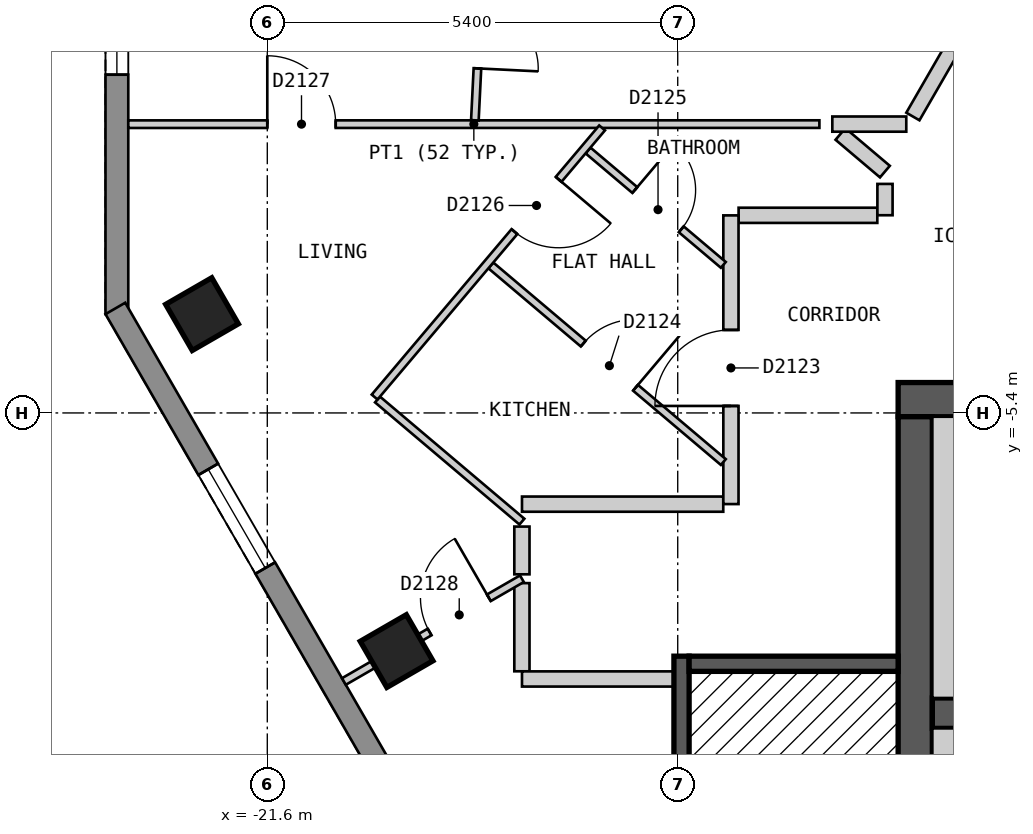
"""IFC4 building model, lengths in metres.
Left out: names, types, materials, properties, quantities, classifications, styles, units other than length and angle.
Written with IfcOpenShell. Run it as: python <this file> out.ifc"""

import sys

from ifc_helpers import new_model, si_unit, direction, frame, frame_2d, origin, origin_2d, place, context, subcontext, project, spatial, polyline, rectangle, outline, extrude, element, fill, save


model = new_model("IFC4")
c1 = context("Model", 3, precision=1e-05, world=origin(), true_north=direction((0.0, 1.0)))
c2 = subcontext(c1, "Body", "Model", "MODEL_VIEW")
j1 = project(units=[si_unit("LENGTHUNIT", "METRE"), si_unit("PLANEANGLEUNIT", "RADIAN")], contexts=[c1])
p1 = place(None, origin())
s1 = spatial("IfcSite", under=j1, at=p1, CompositionType="ELEMENT")
p2 = place(p1, origin())
s2 = spatial("IfcBuilding", under=s1, at=p2, CompositionType="ELEMENT")
p3 = place(p2, frame((0.0, 0.0, 217.8)))
s3 = spatial("IfcBuildingStorey", under=s2, at=p3, CompositionType="ELEMENT", Elevation=217.8)
for number, where, z_axis, x_axis in (
    (1, (-22.459, -4.1, 0.0), (0.0, 0.0, 1.0), (0.5, -0.866, 0.0)),
    (2, (-19.899, -8.533, 0.0), (0.0, 0.0, 1.0), (0.5, -0.866, 0.0)),
):
    element("IfcColumn", number, at=place(p3, frame(where, z_axis=z_axis, x_axis=x_axis)), inside=s3, PredefinedType="COLUMN", context=c2, shape_type="SweptSolid", body=[
        extrude(rectangle(XDim=0.7, YDim=0.7, at=origin_2d()), origin(), (0.0, 0.0, 1.0), 3.0),
    ])
p4 = place(p3, frame((-13.3, -5.225, 0.0), z_axis=(0.0, 0.0, 1.0), x_axis=(1.0, 0.0, 0.0)))
e3 = element("IfcWall", 3, at=p4, inside=s3, PredefinedType="SHEAR", context=c2, shape_type="SweptSolid", body=[
    extrude(rectangle(XDim=26.6, YDim=0.45, at=frame_2d((13.3, 0.0))), origin(), (0.0, 0.0, 1.0), 2.7),
])
p5 = place(p4, frame((23.65, 0.0, 0.0)))
e4 = element("IfcOpeningElement", 4, at=p5, cuts=e3, PredefinedType="OPENING", context=c2, shape_type="SweptSolid", body=[
    extrude(rectangle(XDim=1.2, YDim=2.1, at=frame_2d((0.6, 1.05))), frame((0.0, 0.235, 0.0), z_axis=(0.0, -1.0, 0.0), x_axis=(1.0, 0.0, 0.0)), (0.0, 0.0, 1.0), 0.47),
])
p6 = place(p3, frame((-13.075, -18.55, 0.0), z_axis=(0.0, 0.0, 1.0), x_axis=(0.0, 1.0, 0.0)))
e5 = element("IfcWall", 5, at=p6, inside=s3, PredefinedType="SHEAR", context=c2, shape_type="SweptSolid", body=[
    extrude(rectangle(XDim=13.1, YDim=0.45, at=frame_2d((6.55, 0.0))), origin(), (0.0, 0.0, 1.0), 2.7),
])
p7 = place(p6, frame((4.35, 0.0, 0.0)))
e6 = element("IfcOpeningElement", 6, at=p7, cuts=e5, PredefinedType="OPENING", context=c2, shape_type="SweptSolid", body=[
    extrude(rectangle(XDim=1.2, YDim=2.1, at=frame_2d((0.6, 1.05))), frame((0.0, 0.235, 0.0), z_axis=(0.0, -1.0, 0.0), x_axis=(1.0, 0.0, 0.0)), (0.0, 0.0, 1.0), 0.47),
])
p8 = place(p3, frame((-12.85, -9.35, 0.0), z_axis=(0.0, 0.0, 1.0), x_axis=(1.0, 0.0, 0.0)))
e7 = element("IfcWall", 7, at=p8, inside=s3, PredefinedType="SHEAR", context=c2, shape_type="SweptSolid", body=[
    extrude(rectangle(XDim=23.05, YDim=0.4, at=frame_2d((11.525, 0.0))), origin(), (0.0, 0.0, 1.0), 2.7),
])
p9 = place(p8, frame((1.45, 0.0, 0.0)))
e8 = element("IfcOpeningElement", 8, at=p9, cuts=e7, PredefinedType="OPENING", context=c2, shape_type="SweptSolid", body=[
    extrude(rectangle(XDim=1.1, YDim=2.1, at=frame_2d((0.55, 1.05))), frame((0.0, 0.21, 0.0), z_axis=(0.0, -1.0, 0.0), x_axis=(1.0, 0.0, 0.0)), (0.0, 0.0, 1.0), 0.42),
])
p10 = place(p8, frame((4.25, 0.0, 0.0)))
e9 = element("IfcOpeningElement", 9, at=p10, cuts=e7, PredefinedType="OPENING", context=c2, shape_type="SweptSolid", body=[
    extrude(rectangle(XDim=1.1, YDim=2.1, at=frame_2d((0.55, 1.05))), frame((0.0, 0.21, 0.0), z_axis=(0.0, -1.0, 0.0), x_axis=(1.0, 0.0, 0.0)), (0.0, 0.0, 1.0), 0.42),
])
p11 = place(p8, frame((7.05, 0.0, 0.0)))
e10 = element("IfcOpeningElement", 10, at=p11, cuts=e7, PredefinedType="OPENING", context=c2, shape_type="SweptSolid", body=[
    extrude(rectangle(XDim=1.1, YDim=2.1, at=frame_2d((0.55, 1.05))), frame((0.0, 0.21, 0.0), z_axis=(0.0, -1.0, 0.0), x_axis=(1.0, 0.0, 0.0)), (0.0, 0.0, 1.0), 0.42),
])
p12 = place(p8, frame((9.35, 0.0, 0.0)))
e11 = element("IfcOpeningElement", 11, at=p12, cuts=e7, PredefinedType="OPENING", context=c2, shape_type="SweptSolid", body=[
    extrude(rectangle(XDim=1.1, YDim=2.1, at=frame_2d((0.55, 1.05))), frame((0.0, 0.21, 0.0), z_axis=(0.0, -1.0, 0.0), x_axis=(1.0, 0.0, 0.0)), (0.0, 0.0, 1.0), 0.42),
])
p13 = place(p8, frame((11.65, 0.0, 0.0)))
e12 = element("IfcOpeningElement", 12, at=p13, cuts=e7, PredefinedType="OPENING", context=c2, shape_type="SweptSolid", body=[
    extrude(rectangle(XDim=1.1, YDim=2.1, at=frame_2d((0.55, 1.05))), frame((0.0, 0.21, 0.0), z_axis=(0.0, -1.0, 0.0), x_axis=(1.0, 0.0, 0.0)), (0.0, 0.0, 1.0), 0.42),
])
p14 = place(p8, frame((13.95, 0.0, 0.0)))
e13 = element("IfcOpeningElement", 13, at=p14, cuts=e7, PredefinedType="OPENING", context=c2, shape_type="SweptSolid", body=[
    extrude(rectangle(XDim=1.1, YDim=2.1, at=frame_2d((0.55, 1.05))), frame((0.0, 0.21, 0.0), z_axis=(0.0, -1.0, 0.0), x_axis=(1.0, 0.0, 0.0)), (0.0, 0.0, 1.0), 0.42),
])
p15 = place(p8, frame((16.25, 0.0, 0.0)))
e14 = element("IfcOpeningElement", 14, at=p15, cuts=e7, PredefinedType="OPENING", context=c2, shape_type="SweptSolid", body=[
    extrude(rectangle(XDim=1.1, YDim=2.1, at=frame_2d((0.55, 1.05))), frame((0.0, 0.21, 0.0), z_axis=(0.0, -1.0, 0.0), x_axis=(1.0, 0.0, 0.0)), (0.0, 0.0, 1.0), 0.42),
])
p16 = place(p8, frame((18.55, 0.0, 0.0)))
e15 = element("IfcOpeningElement", 15, at=p16, cuts=e7, PredefinedType="OPENING", context=c2, shape_type="SweptSolid", body=[
    extrude(rectangle(XDim=1.1, YDim=2.1, at=frame_2d((0.55, 1.05))), frame((0.0, 0.21, 0.0), z_axis=(0.0, -1.0, 0.0), x_axis=(1.0, 0.0, 0.0)), (0.0, 0.0, 1.0), 0.42),
])
p17 = place(p8, frame((20.95, 0.0, 0.0)))
e16 = element("IfcOpeningElement", 16, at=p17, cuts=e7, PredefinedType="OPENING", context=c2, shape_type="SweptSolid", body=[
    extrude(rectangle(XDim=1.1, YDim=2.1, at=frame_2d((0.55, 1.05))), frame((0.0, 0.21, 0.0), z_axis=(0.0, -1.0, 0.0), x_axis=(1.0, 0.0, 0.0)), (0.0, 0.0, 1.0), 0.42),
])
p18 = place(p3, frame((-23.579, 0.9, 0.0), z_axis=(0.0, 0.0, 1.0), x_axis=(0.0, -1.0, 0.0)))
e17 = element("IfcWall", 17, at=p18, inside=s3, PredefinedType="SOLIDWALL", context=c2, shape_type="SweptSolid", body=[
    extrude(outline(polyline([(0.0, -0.15), (5.0, -0.15), (4.92, 0.15), (0.08, 0.15), (0.0, -0.15)])), origin(), (0.0, 0.0, 1.0), 2.7),
])
p19 = place(p18, frame((0.65, 0.0, 0.15)))
e18 = element("IfcOpeningElement", 18, at=p19, cuts=e17, PredefinedType="OPENING", context=c2, shape_type="SweptSolid", body=[
    extrude(rectangle(XDim=1.2, YDim=2.1, at=frame_2d((0.6, 1.05))), frame((0.0, 0.16, 0.0), z_axis=(0.0, -1.0, 0.0), x_axis=(1.0, 0.0, 0.0)), (0.0, 0.0, 1.0), 0.32),
])
p20 = place(p3, frame((-23.599, -4.025, 0.0), z_axis=(0.0, 0.0, 1.0), x_axis=(0.500012653391, -0.866018098222, 0.0)))
e19 = element("IfcWall", 19, at=p20, inside=s3, PredefinedType="SOLIDWALL", context=c2, shape_type="SweptSolid", body=[
    extrude(outline(polyline([(0.0, -0.15), (16.628, -0.15), (16.548, 0.15), (0.08, 0.15), (0.0, -0.15)])), origin(), (0.0, 0.0, 1.0), 2.7),
])
p21 = place(p20, frame((2.444, 0.0, 0.15)))
e20 = element("IfcOpeningElement", 20, at=p21, cuts=e19, PredefinedType="OPENING", context=c2, shape_type="SweptSolid", body=[
    extrude(rectangle(XDim=1.5, YDim=2.1, at=frame_2d((0.75, 1.05))), frame((0.0, 0.16, 0.0), z_axis=(0.0, -1.0, 0.0), x_axis=(1.0, 0.0, 0.0)), (0.0, 0.0, 1.0), 0.32),
])
p22 = place(p20, frame((7.564, 0.0, 0.15)))
e21 = element("IfcOpeningElement", 21, at=p22, cuts=e19, PredefinedType="OPENING", context=c2, shape_type="SweptSolid", body=[
    extrude(rectangle(XDim=1.5, YDim=2.1, at=frame_2d((0.75, 1.05))), frame((0.0, 0.16, 0.0), z_axis=(0.0, -1.0, 0.0), x_axis=(1.0, 0.0, 0.0)), (0.0, 0.0, 1.0), 0.32),
])
p23 = place(p20, frame((12.682, 0.0, 0.15)))
e22 = element("IfcOpeningElement", 22, at=p23, cuts=e19, PredefinedType="OPENING", context=c2, shape_type="SweptSolid", body=[
    extrude(rectangle(XDim=1.5, YDim=2.1, at=frame_2d((0.75, 1.05))), frame((0.0, 0.16, 0.0), z_axis=(0.0, -1.0, 0.0), x_axis=(1.0, 0.0, 0.0)), (0.0, 0.0, 1.0), 0.32),
])
p24 = place(p3, frame((-18.25, -7.639, 0.0), z_axis=(0.0, 0.0, 1.0), x_axis=(0.0, -1.0, 0.0)))
e23 = element("IfcWall", 23, at=p24, inside=s3, PredefinedType="PARTITIONING", context=c2, shape_type="SweptSolid", body=[
    extrude(rectangle(XDim=1.16, YDim=0.2, at=frame_2d((0.58, 0.0))), origin(), (0.0, 0.0, 1.0), 2.7),
])
p25 = place(p3, frame((-18.249, -6.6, 0.0), z_axis=(0.0, 0.0, 1.0), x_axis=(1.0, 0.0, 0.0)))
e24 = element("IfcWall", 24, at=p25, inside=s3, PredefinedType="PARTITIONING", context=c2, shape_type="SweptSolid", body=[
    extrude(rectangle(XDim=2.648, YDim=0.2, at=frame_2d((1.324, 0.0))), origin(), (0.0, 0.0, 1.0), 2.7),
])
p26 = place(p3, frame((-18.249, -8.9, 0.0), z_axis=(0.0, 0.0, 1.0), x_axis=(1.0, 0.0, 0.0)))
e25 = element("IfcWall", 25, at=p26, inside=s3, PredefinedType="PARTITIONING", context=c2, shape_type="SweptSolid", body=[
    extrude(rectangle(XDim=2.199, YDim=0.2, at=frame_2d((1.1, 0.0))), origin(), (0.0, 0.0, 1.0), 2.7),
])
p27 = place(p3, frame((-15.399, -2.8, 0.0), z_axis=(0.0, 0.0, 1.0), x_axis=(1.0, 0.0, 0.0)))
e26 = element("IfcWall", 26, at=p27, inside=s3, PredefinedType="PARTITIONING", context=c2, shape_type="SweptSolid", body=[
    extrude(rectangle(XDim=1.825, YDim=0.2, at=frame_2d((0.913, 0.0))), origin(), (0.0, 0.0, 1.0), 2.7),
])
p28 = place(p3, frame((-13.106, -1.5, 0.0), z_axis=(0.0, 0.0, 1.0), x_axis=(0.500025705601, 0.86601056214, 0.0)))
e27 = element("IfcWall", 27, at=p28, inside=s3, PredefinedType="PARTITIONING", context=c2, shape_type="SweptSolid", body=[
    extrude(rectangle(XDim=7.735, YDim=0.2, at=frame_2d((3.868, 0.0))), origin(), (0.0, 0.0, 1.0), 2.7),
])
p29 = place(p28, frame((4.748, 0.0, 0.0)))
e28 = element("IfcOpeningElement", 28, at=p29, cuts=e27, PredefinedType="OPENING", context=c2, shape_type="SweptSolid", body=[
    extrude(rectangle(XDim=1.0, YDim=2.1, at=frame_2d((0.5, 1.05))), frame((0.0, 0.11, 0.0), z_axis=(0.0, -1.0, 0.0), x_axis=(1.0, 0.0, 0.0)), (0.0, 0.0, 1.0), 0.22),
])
p30 = place(p3, frame((-13.473, -2.799, 0.0), z_axis=(0.0, 0.0, 1.0), x_axis=(0.0, 1.0, 0.0)))
e29 = element("IfcWall", 29, at=p30, inside=s3, PredefinedType="PARTITIONING", context=c2, shape_type="SweptSolid", body=[
    extrude(rectangle(XDim=0.412, YDim=0.2, at=frame_2d((0.206, 0.0))), origin(), (0.0, 0.0, 1.0), 2.7),
])
p31 = place(p3, frame((-15.5, -6.599, 0.0), z_axis=(0.0, 0.0, 1.0), x_axis=(0.0, 1.0, 0.0)))
e30 = element("IfcWall", 30, at=p31, inside=s3, PredefinedType="PARTITIONING", context=c2, shape_type="SweptSolid", body=[
    extrude(rectangle(XDim=3.798, YDim=0.2, at=frame_2d((1.899, 0.0))), origin(), (0.0, 0.0, 1.0), 2.7),
])
p32 = place(p31, frame((1.291, 0.0, 0.0)))
e31 = element("IfcOpeningElement", 31, at=p32, cuts=e30, PredefinedType="OPENING", context=c2, shape_type="SweptSolid", body=[
    extrude(rectangle(XDim=1.0, YDim=2.1, at=frame_2d((0.5, 1.05))), frame((0.0, 0.11, 0.0), z_axis=(0.0, -1.0, 0.0), x_axis=(1.0, 0.0, 0.0)), (0.0, 0.0, 1.0), 0.22),
])
p33 = place(p3, frame((-18.25, -7.523, 0.0), z_axis=(0.0, 0.0, 1.0), x_axis=(0.0, 1.0, 0.0)))
e32 = element("IfcWall", 32, at=p33, inside=s3, PredefinedType="PARTITIONING", context=c2, shape_type="SweptSolid", body=[
    extrude(rectangle(XDim=0.628, YDim=0.2, at=frame_2d((0.314, 0.0))), origin(), (0.0, 0.0, 1.0), 2.7),
])
p34 = place(p3, frame((-17.38, -1.947, 0.0), z_axis=(0.0, 0.0, 1.0), x_axis=(0.763616683524, -0.645669854217, 0.0)))
e33 = element("IfcWall", 33, at=p34, inside=s3, PredefinedType="PARTITIONING", context=c2, shape_type="SweptSolid", body=[
    extrude(rectangle(XDim=2.331, YDim=0.1, at=frame_2d((1.166, 0.0))), origin(), (0.0, 0.0, 1.0), 2.7),
])
p35 = place(p34, frame((0.806, 0.0, 0.0)))
e34 = element("IfcOpeningElement", 34, at=p35, cuts=e33, PredefinedType="OPENING", context=c2, shape_type="SweptSolid", body=[
    extrude(rectangle(XDim=0.8, YDim=2.1, at=frame_2d((0.4, 1.05))), frame((0.0, 0.06, 0.0), z_axis=(0.0, -1.0, 0.0), x_axis=(1.0, 0.0, 0.0)), (0.0, 0.0, 1.0), 0.12),
])
p36 = place(p3, frame((-18.659, -3.459, 0.0), z_axis=(0.0, 0.0, 1.0), x_axis=(0.763550385572, -0.64574825489, 0.0)))
e35 = element("IfcWall", 35, at=p36, inside=s3, PredefinedType="PARTITIONING", context=c2, shape_type="SweptSolid", body=[
    extrude(rectangle(XDim=4.006, YDim=0.1, at=frame_2d((2.003, 0.0))), origin(), (0.0, 0.0, 1.0), 2.7),
])
p37 = place(p36, frame((1.593, 0.0, 0.0)))
e36 = element("IfcOpeningElement", 36, at=p37, cuts=e35, PredefinedType="OPENING", context=c2, shape_type="SweptSolid", body=[
    extrude(rectangle(XDim=0.9, YDim=2.1, at=frame_2d((0.45, 1.05))), frame((0.0, 0.06, 0.0), z_axis=(0.0, -1.0, 0.0), x_axis=(1.0, 0.0, 0.0)), (0.0, 0.0, 1.0), 0.12),
])
p38 = place(p3, frame((-20.15, -5.223, 0.0), z_axis=(0.0, 0.0, 1.0), x_axis=(0.763471868926, -0.645841083672, 0.0)))
e37 = element("IfcWall", 37, at=p38, inside=s3, PredefinedType="PARTITIONING", context=c2, shape_type="SweptSolid", body=[
    extrude(rectangle(XDim=2.489, YDim=0.1, at=frame_2d((1.244, 0.0))), origin(), (0.0, 0.0, 1.0), 2.7),
])
p39 = place(p3, frame((-23.429, -1.601, 0.0), z_axis=(0.0, 0.0, 1.0), x_axis=(0.999999994233, 0.000107396965, 0.0)))
e38 = element("IfcWall", 38, at=p39, inside=s3, PredefinedType="PARTITIONING", context=c2, shape_type="SweptSolid", body=[
    extrude(rectangle(XDim=9.093, YDim=0.1, at=frame_2d((4.546, 0.0))), origin(), (0.0, 0.0, 1.0), 2.7),
])
p40 = place(p39, frame((1.829, 0.0, 0.0)))
e39 = element("IfcOpeningElement", 39, at=p40, cuts=e38, PredefinedType="OPENING", context=c2, shape_type="SweptSolid", body=[
    extrude(rectangle(XDim=0.9, YDim=2.1, at=frame_2d((0.45, 1.05))), frame((0.0, 0.06, 0.0), z_axis=(0.0, -1.0, 0.0), x_axis=(1.0, 0.0, 0.0)), (0.0, 0.0, 1.0), 0.12),
])
p41 = place(p3, frame((-20.188, -5.191, 0.0), z_axis=(0.0, 0.0, 1.0), x_axis=(0.645524337256, 0.763739700429, 0.0)))
e40 = element("IfcWall", 40, at=p41, inside=s3, PredefinedType="PARTITIONING", context=c2, shape_type="SweptSolid", body=[
    extrude(rectangle(XDim=4.636, YDim=0.1, at=frame_2d((2.318, 0.0))), origin(), (0.0, 0.0, 1.0), 2.7),
])
p42 = place(p41, frame((2.85, 0.0, 0.0)))
e41 = element("IfcOpeningElement", 41, at=p42, cuts=e40, PredefinedType="OPENING", context=c2, shape_type="SweptSolid", body=[
    extrude(rectangle(XDim=0.9, YDim=2.1, at=frame_2d((0.45, 1.05))), frame((0.0, 0.06, 0.0), z_axis=(0.0, -1.0, 0.0), x_axis=(1.0, 0.0, 0.0)), (0.0, 0.0, 1.0), 0.12),
])
p43 = place(p3, frame((-18.869, -1.55, 0.0), z_axis=(0.0, 0.0, 1.0), x_axis=(0.049189853645, 0.998789446429, 0.0)))
e42 = element("IfcWall", 42, at=p43, inside=s3, PredefinedType="PARTITIONING", context=c2, shape_type="SweptSolid", body=[
    extrude(rectangle(XDim=1.97, YDim=0.1, at=frame_2d((0.985, 0.0))), origin(), (0.0, 0.0, 1.0), 2.7),
])
p44 = place(p43, frame((0.684, 0.0, 0.0)))
e43 = element("IfcOpeningElement", 43, at=p44, cuts=e42, PredefinedType="OPENING", context=c2, shape_type="SweptSolid", body=[
    extrude(rectangle(XDim=0.8, YDim=2.1, at=frame_2d((0.4, 1.05))), frame((0.0, 0.06, 0.0), z_axis=(0.0, -1.0, 0.0), x_axis=(1.0, 0.0, 0.0)), (0.0, 0.0, 1.0), 0.12),
])
p45 = place(p3, frame((-20.592, -8.933, 0.0), z_axis=(0.0, 0.0, 1.0), x_axis=(0.866045775131, 0.499964714133, 0.0)))
e44 = element("IfcWall", 44, at=p45, inside=s3, PredefinedType="PARTITIONING", context=c2, shape_type="SweptSolid", body=[
    extrude(rectangle(XDim=2.704, YDim=0.1, at=frame_2d((1.352, 0.0))), origin(), (0.0, 0.0, 1.0), 2.7),
])
p46 = place(p45, frame((1.302, 0.0, 0.0)))
e45 = element("IfcOpeningElement", 45, at=p46, cuts=e44, PredefinedType="OPENING", context=c2, shape_type="SweptSolid", body=[
    extrude(rectangle(XDim=0.9, YDim=2.1, at=frame_2d((0.45, 1.05))), frame((0.0, 0.06, 0.0), z_axis=(0.0, -1.0, 0.0), x_axis=(1.0, 0.0, 0.0)), (0.0, 0.0, 1.0), 0.12),
])
p47 = place(p3, frame((-14.059, -1.73, 0.0), z_axis=(0.0, 0.0, 1.0), x_axis=(0.763289607824, -0.64605647941, 0.0)))
e46 = element("IfcWall", 46, at=p47, inside=s3, PredefinedType="PARTITIONING", context=c2, shape_type="SweptSolid", body=[
    extrude(rectangle(XDim=0.766, YDim=0.2, at=frame_2d((0.383, 0.0))), origin(), (0.0, 0.0, 1.0), 2.7),
])
p48 = place(p3, frame((-14.166, -1.6, 0.0), z_axis=(0.0, 0.0, 1.0), x_axis=(1.0, 0.0, 0.0)))
e47 = element("IfcWall", 47, at=p48, inside=s3, PredefinedType="PARTITIONING", context=c2, shape_type="SweptSolid", body=[
    extrude(rectangle(XDim=0.973, YDim=0.2, at=frame_2d((0.486, 0.0))), origin(), (0.0, 0.0, 1.0), 2.7),
])
p49 = place(p3, frame((-16.15, -14.4, 0.0), z_axis=(0.0, 0.0, 1.0), x_axis=(0.0, 1.0, 0.0)))
e48 = element("IfcWall", 48, at=p49, inside=s3, PredefinedType="SOLIDWALL", context=c2, shape_type="SweptSolid", body=[
    extrude(rectangle(XDim=5.8, YDim=0.2, at=frame_2d((2.9, 0.0))), origin(), (0.0, 0.0, 1.0), 2.7),
])
p50 = place(p3, frame((-16.05, -8.7, 0.0), z_axis=(0.0, 0.0, 1.0), x_axis=(1.0, 0.0, 0.0)))
e49 = element("IfcWall", 49, at=p50, inside=s3, PredefinedType="SOLIDWALL", context=c2, shape_type="SweptSolid", body=[
    extrude(rectangle(XDim=2.75, YDim=0.2, at=frame_2d((1.375, 0.0))), origin(), (0.0, 0.0, 1.0), 2.7),
])
p51 = place(p3, frame((-12.475, -13.0, 0.0), z_axis=(0.0, 0.0, 1.0), x_axis=(0.0, 1.0, 0.0)))
e50 = element("IfcWall", 50, at=p51, inside=s3, PredefinedType="PARTITIONING", context=c2, shape_type="SweptSolid", body=[
    extrude(rectangle(XDim=3.45, YDim=0.75, at=frame_2d((1.725, 0.0))), origin(), (0.0, 0.0, 1.0), 2.7),
])
p52 = place(p3, frame((-12.475, -9.15, 0.0), z_axis=(0.0, 0.0, 1.0), x_axis=(0.0, 1.0, 0.0)))
e51 = element("IfcWall", 51, at=p52, inside=s3, PredefinedType="SOLIDWALL", context=c2, shape_type="SweptSolid", body=[
    extrude(rectangle(XDim=3.7, YDim=0.75, at=frame_2d((1.85, 0.0))), origin(), (0.0, 0.0, 1.0), 2.7),
])
p53 = place(p19, origin())
e52 = element("IfcWindow", 52, at=p53, inside=s3, PartitioningType="SINGLE_PANEL", PredefinedType="WINDOW", context=c2, shape_type="SweptSolid", body=[
    extrude(rectangle(XDim=1.2, YDim=2.1, at=frame_2d((0.6, 1.05))), frame((0.0, 0.03, 0.0), z_axis=(0.0, -1.0, 0.0), x_axis=(1.0, 0.0, 0.0)), (0.0, 0.0, 1.0), 0.06),
])
fill(e18, e52)
p54 = place(p21, origin())
e53 = element("IfcWindow", 53, at=p54, inside=s3, PartitioningType="SINGLE_PANEL", PredefinedType="WINDOW", context=c2, shape_type="SweptSolid", body=[
    extrude(rectangle(XDim=1.5, YDim=2.1, at=frame_2d((0.75, 1.05))), frame((0.0, 0.03, 0.0), z_axis=(0.0, -1.0, 0.0), x_axis=(1.0, 0.0, 0.0)), (0.0, 0.0, 1.0), 0.06),
])
fill(e20, e53)
p55 = place(p32, origin())
e54 = element("IfcDoor", 54, at=p55, inside=s3, OperationType="SINGLE_SWING_LEFT", PredefinedType="DOOR", context=c2, shape_type="SweptSolid", body=[
    extrude(rectangle(XDim=1.0, YDim=2.1, at=frame_2d((0.5, 1.05))), frame((0.0, 0.025, 0.0), z_axis=(0.0, -1.0, 0.0), x_axis=(1.0, 0.0, 0.0)), (0.0, 0.0, 1.0), 0.05),
])
fill(e31, e54)
p56 = place(p37, origin())
e55 = element("IfcDoor", 55, at=p56, inside=s3, OperationType="SINGLE_SWING_RIGHT", PredefinedType="DOOR", context=c2, shape_type="SweptSolid", body=[
    extrude(rectangle(XDim=0.9, YDim=2.1, at=frame_2d((0.45, 1.05))), frame((0.0, 0.025, 0.0), z_axis=(0.0, -1.0, 0.0), x_axis=(1.0, 0.0, 0.0)), (0.0, 0.0, 1.0), 0.05),
])
fill(e36, e55)
p57 = place(p35, origin())
e56 = element("IfcDoor", 56, at=p57, inside=s3, OperationType="SINGLE_SWING_LEFT", PredefinedType="DOOR", context=c2, shape_type="SweptSolid", body=[
    extrude(rectangle(XDim=0.8, YDim=2.1, at=frame_2d((0.4, 1.05))), frame((0.0, 0.025, 0.0), z_axis=(0.0, -1.0, 0.0), x_axis=(1.0, 0.0, 0.0)), (0.0, 0.0, 1.0), 0.05),
])
fill(e34, e56)
p58 = place(p42, origin())
e57 = element("IfcDoor", 57, at=p58, inside=s3, OperationType="SINGLE_SWING_RIGHT", PredefinedType="DOOR", context=c2, shape_type="SweptSolid", body=[
    extrude(rectangle(XDim=0.9, YDim=2.1, at=frame_2d((0.45, 1.05))), frame((0.0, 0.025, 0.0), z_axis=(0.0, -1.0, 0.0), x_axis=(1.0, 0.0, 0.0)), (0.0, 0.0, 1.0), 0.05),
])
fill(e41, e57)
p59 = place(p40, origin())
e58 = element("IfcDoor", 58, at=p59, inside=s3, OperationType="SINGLE_SWING_LEFT", PredefinedType="DOOR", context=c2, shape_type="SweptSolid", body=[
    extrude(rectangle(XDim=0.9, YDim=2.1, at=frame_2d((0.45, 1.05))), frame((0.0, 0.025, 0.0), z_axis=(0.0, -1.0, 0.0), x_axis=(1.0, 0.0, 0.0)), (0.0, 0.0, 1.0), 0.05),
])
fill(e39, e58)
p60 = place(p46, origin())
e59 = element("IfcDoor", 59, at=p60, inside=s3, OperationType="SINGLE_SWING_RIGHT", PredefinedType="DOOR", context=c2, shape_type="SweptSolid", body=[
    extrude(rectangle(XDim=0.9, YDim=2.1, at=frame_2d((0.45, 1.05))), frame((0.0, 0.025, 0.0), z_axis=(0.0, -1.0, 0.0), x_axis=(1.0, 0.0, 0.0)), (0.0, 0.0, 1.0), 0.05),
])
fill(e45, e59)
p61 = place(p44, origin())
e60 = element("IfcDoor", 60, at=p61, inside=s3, OperationType="SINGLE_SWING_LEFT", PredefinedType="DOOR", context=c2, shape_type="SweptSolid", body=[
    extrude(rectangle(XDim=0.8, YDim=2.1, at=frame_2d((0.4, 1.05))), frame((0.0, 0.025, 0.0), z_axis=(0.0, -1.0, 0.0), x_axis=(1.0, 0.0, 0.0)), (0.0, 0.0, 1.0), 0.05),
])
fill(e43, e60)
save(model, sys.argv[1])
